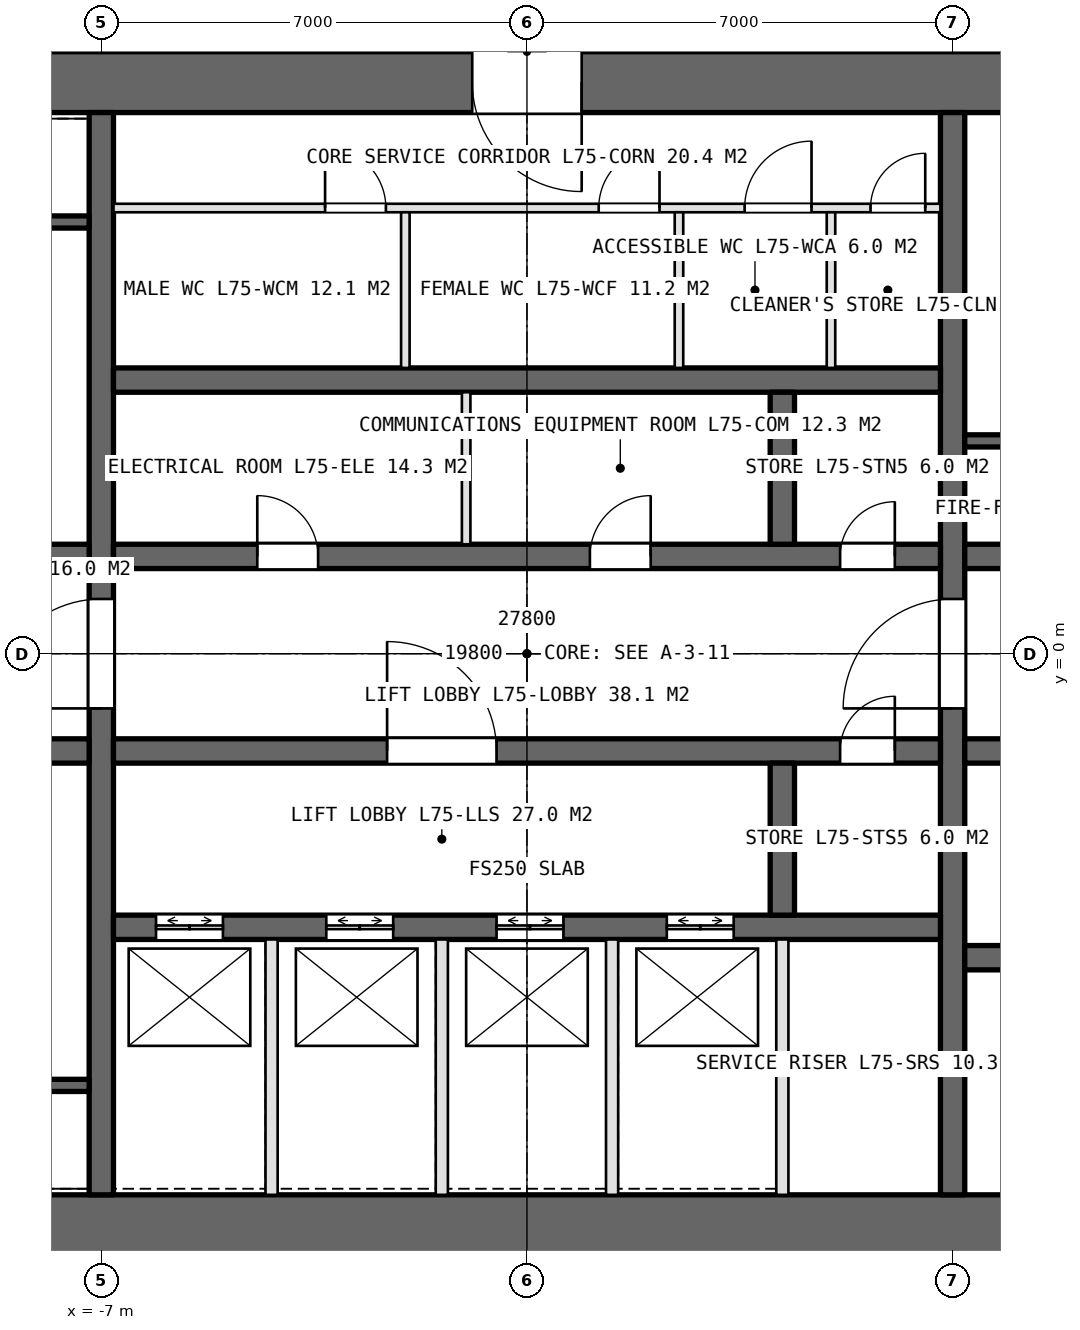
"""IFC4 building model, lengths in metres.
Left out: names, types, materials, properties, quantities, classifications, styles, units other than length and angle.
Written with IfcOpenShell. Run it as: python <this file> out.ifc"""

import sys

from ifc_helpers import new_model, si_unit, direction, frame, frame_2d, origin, place, context, subcontext, project, spatial, rectangle, extrude, element, fill, save


model = new_model("IFC4")
c1 = context("Model", 3, precision=1e-05, world=origin(), true_north=direction((0.0, 1.0)))
c2 = subcontext(c1, "Body", "Model", "MODEL_VIEW")
j1 = project(units=[si_unit("LENGTHUNIT", "METRE"), si_unit("PLANEANGLEUNIT", "RADIAN")], contexts=[c1])
p1 = place(None, origin())
s1 = spatial("IfcSite", under=j1, at=p1, CompositionType="ELEMENT")
p2 = place(p1, origin())
s2 = spatial("IfcBuilding", under=s1, at=p2, CompositionType="ELEMENT")
p3 = place(p2, frame((0.0, 0.0, 334.2)))
s3 = spatial("IfcBuildingStorey", under=s2, at=p3, CompositionType="ELEMENT", Elevation=334.2)
p4 = place(p3, frame((-13.9, -9.4, 0.0), z_axis=(0.0, 0.0, 1.0), x_axis=(1.0, 0.0, 0.0)))
e1 = element("IfcWall", 1, at=p4, inside=s3, PredefinedType="SHEAR", context=c2, shape_type="SweptSolid", body=[
    extrude(rectangle(XDim=27.8, YDim=1.0, at=frame_2d((13.9, 0.0))), origin(), (0.0, 0.0, 1.0), 5.0),
])
p5 = place(p4, frame((22.95, 0.0, 0.0)))
e2 = element("IfcOpeningElement", 2, at=p5, cuts=e1, PredefinedType="OPENING", context=c2, shape_type="SweptSolid", body=[
    extrude(rectangle(XDim=2.2, YDim=2.7, at=frame_2d((1.1, 1.35))), frame((0.0, 0.51, 0.0), z_axis=(0.0, -1.0, 0.0), x_axis=(1.0, 0.0, 0.0)), (0.0, 0.0, 1.0), 1.02),
])
p6 = place(p3, frame((13.9, 9.4, 0.0), z_axis=(0.0, 0.0, 1.0), x_axis=(-1.0, 0.0, 0.0)))
e3 = element("IfcWall", 3, at=p6, inside=s3, PredefinedType="SHEAR", context=c2, shape_type="SweptSolid", body=[
    extrude(rectangle(XDim=27.8, YDim=1.0, at=frame_2d((13.9, 0.0))), origin(), (0.0, 0.0, 1.0), 5.0),
])
p7 = place(p6, frame((23.9, 0.0, 0.0)))
e4 = element("IfcOpeningElement", 4, at=p7, cuts=e3, PredefinedType="OPENING", context=c2, shape_type="SweptSolid", body=[
    extrude(rectangle(XDim=1.0, YDim=2.4, at=frame_2d((0.5, 1.2))), frame((0.0, 0.51, 0.0), z_axis=(0.0, -1.0, 0.0), x_axis=(1.0, 0.0, 0.0)), (0.0, 0.0, 1.0), 1.02),
])
p8 = place(p6, frame((13.0, 0.0, 0.0)))
e5 = element("IfcOpeningElement", 5, at=p8, cuts=e3, PredefinedType="OPENING", context=c2, shape_type="SweptSolid", body=[
    extrude(rectangle(XDim=1.8, YDim=2.4, at=frame_2d((0.9, 1.2))), frame((0.0, 0.51, 0.0), z_axis=(0.0, -1.0, 0.0), x_axis=(1.0, 0.0, 0.0)), (0.0, 0.0, 1.0), 1.02),
])
p9 = place(p3, frame((-7.0, -8.9, 0.0), z_axis=(0.0, 0.0, 1.0), x_axis=(0.0, 1.0, 0.0)))
e6 = element("IfcWall", 6, at=p9, inside=s3, PredefinedType="SHEAR", context=c2, shape_type="SweptSolid", body=[
    extrude(rectangle(XDim=17.8, YDim=0.4, at=frame_2d((8.9, 0.0))), origin(), (0.0, 0.0, 1.0), 5.0),
])
p10 = place(p9, frame((8.0, 0.0, 0.0)))
e7 = element("IfcOpeningElement", 7, at=p10, cuts=e6, PredefinedType="OPENING", context=c2, shape_type="SweptSolid", body=[
    extrude(rectangle(XDim=1.8, YDim=2.4, at=frame_2d((0.9, 1.2))), frame((0.0, 0.21, 0.0), z_axis=(0.0, -1.0, 0.0), x_axis=(1.0, 0.0, 0.0)), (0.0, 0.0, 1.0), 0.42),
])
p11 = place(p3, frame((7.0, -8.9, 0.0), z_axis=(0.0, 0.0, 1.0), x_axis=(0.0, 1.0, 0.0)))
e8 = element("IfcWall", 8, at=p11, inside=s3, PredefinedType="SHEAR", context=c2, shape_type="SweptSolid", body=[
    extrude(rectangle(XDim=17.8, YDim=0.4, at=frame_2d((8.9, 0.0))), origin(), (0.0, 0.0, 1.0), 5.0),
])
p12 = place(p11, frame((8.0, 0.0, 0.0)))
e9 = element("IfcOpeningElement", 9, at=p12, cuts=e8, PredefinedType="OPENING", context=c2, shape_type="SweptSolid", body=[
    extrude(rectangle(XDim=1.8, YDim=2.4, at=frame_2d((0.9, 1.2))), frame((0.0, 0.21, 0.0), z_axis=(0.0, -1.0, 0.0), x_axis=(1.0, 0.0, 0.0)), (0.0, 0.0, 1.0), 0.42),
])
p13 = place(p3, frame((-6.8, 1.6, 0.0), z_axis=(0.0, 0.0, 1.0), x_axis=(1.0, 0.0, 0.0)))
e10 = element("IfcWall", 10, at=p13, inside=s3, PredefinedType="SHEAR", context=c2, shape_type="SweptSolid", body=[
    extrude(rectangle(XDim=13.6, YDim=0.4, at=frame_2d((6.8, 0.0))), origin(), (0.0, 0.0, 1.0), 5.0),
])
p14 = place(p13, frame((2.365, 0.0, 0.0)))
e11 = element("IfcOpeningElement", 11, at=p14, cuts=e10, PredefinedType="OPENING", context=c2, shape_type="SweptSolid", body=[
    extrude(rectangle(XDim=1.0, YDim=2.4, at=frame_2d((0.5, 1.2))), frame((0.0, 0.21, 0.0), z_axis=(0.0, -1.0, 0.0), x_axis=(1.0, 0.0, 0.0)), (0.0, 0.0, 1.0), 0.42),
])
p15 = place(p13, frame((7.835, 0.0, 0.0)))
e12 = element("IfcOpeningElement", 12, at=p15, cuts=e10, PredefinedType="OPENING", context=c2, shape_type="SweptSolid", body=[
    extrude(rectangle(XDim=1.0, YDim=2.4, at=frame_2d((0.5, 1.2))), frame((0.0, 0.21, 0.0), z_axis=(0.0, -1.0, 0.0), x_axis=(1.0, 0.0, 0.0)), (0.0, 0.0, 1.0), 0.42),
])
p16 = place(p13, frame((11.95, 0.0, 0.0)))
e13 = element("IfcOpeningElement", 13, at=p16, cuts=e10, PredefinedType="OPENING", context=c2, shape_type="SweptSolid", body=[
    extrude(rectangle(XDim=0.9, YDim=2.4, at=frame_2d((0.45, 1.2))), frame((0.0, 0.21, 0.0), z_axis=(0.0, -1.0, 0.0), x_axis=(1.0, 0.0, 0.0)), (0.0, 0.0, 1.0), 0.42),
])
p17 = place(p3, frame((-6.8, -1.6, 0.0), z_axis=(0.0, 0.0, 1.0), x_axis=(1.0, 0.0, 0.0)))
e14 = element("IfcWall", 14, at=p17, inside=s3, PredefinedType="SHEAR", context=c2, shape_type="SweptSolid", body=[
    extrude(rectangle(XDim=13.6, YDim=0.4, at=frame_2d((6.8, 0.0))), origin(), (0.0, 0.0, 1.0), 5.0),
])
p18 = place(p17, frame((11.95, 0.0, 0.0)))
e15 = element("IfcOpeningElement", 15, at=p18, cuts=e14, PredefinedType="OPENING", context=c2, shape_type="SweptSolid", body=[
    extrude(rectangle(XDim=0.9, YDim=2.4, at=frame_2d((0.45, 1.2))), frame((0.0, 0.21, 0.0), z_axis=(0.0, -1.0, 0.0), x_axis=(1.0, 0.0, 0.0)), (0.0, 0.0, 1.0), 0.42),
])
p19 = place(p17, frame((4.5, 0.0, 0.0)))
e16 = element("IfcOpeningElement", 16, at=p19, cuts=e14, PredefinedType="OPENING", context=c2, shape_type="SweptSolid", body=[
    extrude(rectangle(XDim=1.8, YDim=2.4, at=frame_2d((0.9, 1.2))), frame((0.0, 0.21, 0.0), z_axis=(0.0, -1.0, 0.0), x_axis=(1.0, 0.0, 0.0)), (0.0, 0.0, 1.0), 0.42),
])
p20 = place(p3, frame((-6.8, 4.5, 0.0), z_axis=(0.0, 0.0, 1.0), x_axis=(1.0, 0.0, 0.0)))
e17 = element("IfcWall", 17, at=p20, inside=s3, PredefinedType="SHEAR", context=c2, shape_type="SweptSolid", body=[
    extrude(rectangle(XDim=13.6, YDim=0.4, at=frame_2d((6.8, 0.0))), origin(), (0.0, 0.0, 1.0), 5.0),
])
p21 = place(p3, frame((-6.8, -4.5, 0.0), z_axis=(0.0, 0.0, 1.0), x_axis=(1.0, 0.0, 0.0)))
e18 = element("IfcWall", 18, at=p21, inside=s3, PredefinedType="SHEAR", context=c2, shape_type="SweptSolid", body=[
    extrude(rectangle(XDim=13.6, YDim=0.4, at=frame_2d((6.8, 0.0))), origin(), (0.0, 0.0, 1.0), 5.0),
])
p22 = place(p21, frame((0.7, 0.0, 0.0)))
e19 = element("IfcOpeningElement", 19, at=p22, cuts=e18, PredefinedType="OPENING", context=c2, shape_type="SweptSolid", body=[
    extrude(rectangle(XDim=1.1, YDim=2.4, at=frame_2d((0.55, 1.2))), frame((0.0, 0.21, 0.0), z_axis=(0.0, -1.0, 0.0), x_axis=(1.0, 0.0, 0.0)), (0.0, 0.0, 1.0), 0.42),
])
p23 = place(p21, frame((3.5, 0.0, 0.0)))
e20 = element("IfcOpeningElement", 20, at=p23, cuts=e18, PredefinedType="OPENING", context=c2, shape_type="SweptSolid", body=[
    extrude(rectangle(XDim=1.1, YDim=2.4, at=frame_2d((0.55, 1.2))), frame((0.0, 0.21, 0.0), z_axis=(0.0, -1.0, 0.0), x_axis=(1.0, 0.0, 0.0)), (0.0, 0.0, 1.0), 0.42),
])
p24 = place(p21, frame((6.3, 0.0, 0.0)))
e21 = element("IfcOpeningElement", 21, at=p24, cuts=e18, PredefinedType="OPENING", context=c2, shape_type="SweptSolid", body=[
    extrude(rectangle(XDim=1.1, YDim=2.4, at=frame_2d((0.55, 1.2))), frame((0.0, 0.21, 0.0), z_axis=(0.0, -1.0, 0.0), x_axis=(1.0, 0.0, 0.0)), (0.0, 0.0, 1.0), 0.42),
])
p25 = place(p21, frame((9.1, 0.0, 0.0)))
e22 = element("IfcOpeningElement", 22, at=p25, cuts=e18, PredefinedType="OPENING", context=c2, shape_type="SweptSolid", body=[
    extrude(rectangle(XDim=1.1, YDim=2.4, at=frame_2d((0.55, 1.2))), frame((0.0, 0.21, 0.0), z_axis=(0.0, -1.0, 0.0), x_axis=(1.0, 0.0, 0.0)), (0.0, 0.0, 1.0), 0.42),
])
for number, where, z_axis, x_axis in (
    (23, (-12.9, 1.6, 0.0), (0.0, 0.0, 1.0), (1.0, 0.0, 0.0)),
    (24, (-12.9, -1.6, 0.0), (0.0, 0.0, 1.0), (1.0, 0.0, 0.0)),
):
    element("IfcWall", number, at=place(p3, frame(where, z_axis=z_axis, x_axis=x_axis)), inside=s3, PredefinedType="SHEAR", context=c2, shape_type="SweptSolid", body=[
        extrude(rectangle(XDim=5.7, YDim=0.4, at=frame_2d((2.85, 0.0))), origin(), (0.0, 0.0, 1.0), 5.0),
    ])
p26 = place(p3, frame((7.2, 1.6, 0.0), z_axis=(0.0, 0.0, 1.0), x_axis=(1.0, 0.0, 0.0)))
e25 = element("IfcWall", 25, at=p26, inside=s3, PredefinedType="SHEAR", context=c2, shape_type="SweptSolid", body=[
    extrude(rectangle(XDim=5.7, YDim=0.4, at=frame_2d((2.85, 0.0))), origin(), (0.0, 0.0, 1.0), 5.0),
])
p27 = place(p26, frame((0.7, 0.0, 0.0)))
e26 = element("IfcOpeningElement", 26, at=p27, cuts=e25, PredefinedType="OPENING", context=c2, shape_type="SweptSolid", body=[
    extrude(rectangle(XDim=1.0, YDim=2.4, at=frame_2d((0.5, 1.2))), frame((0.0, 0.21, 0.0), z_axis=(0.0, -1.0, 0.0), x_axis=(1.0, 0.0, 0.0)), (0.0, 0.0, 1.0), 0.42),
])
p28 = place(p3, frame((7.2, -1.6, 0.0), z_axis=(0.0, 0.0, 1.0), x_axis=(1.0, 0.0, 0.0)))
e27 = element("IfcWall", 27, at=p28, inside=s3, PredefinedType="SHEAR", context=c2, shape_type="SweptSolid", body=[
    extrude(rectangle(XDim=5.7, YDim=0.4, at=frame_2d((2.85, 0.0))), origin(), (0.0, 0.0, 1.0), 5.0),
])
p29 = place(p28, frame((0.9, 0.0, 0.0)))
e28 = element("IfcOpeningElement", 28, at=p29, cuts=e27, PredefinedType="OPENING", context=c2, shape_type="SweptSolid", body=[
    extrude(rectangle(XDim=1.3, YDim=2.4, at=frame_2d((0.65, 1.2))), frame((0.0, 0.21, 0.0), z_axis=(0.0, -1.0, 0.0), x_axis=(1.0, 0.0, 0.0)), (0.0, 0.0, 1.0), 0.42),
])
p30 = place(p28, frame((3.95, 0.0, 0.0)))
e29 = element("IfcOpeningElement", 29, at=p30, cuts=e27, PredefinedType="OPENING", context=c2, shape_type="SweptSolid", body=[
    extrude(rectangle(XDim=1.3, YDim=2.4, at=frame_2d((0.65, 1.2))), frame((0.0, 0.21, 0.0), z_axis=(0.0, -1.0, 0.0), x_axis=(1.0, 0.0, 0.0)), (0.0, 0.0, 1.0), 0.42),
])
p31 = place(p3, frame((7.2, -5.0, 0.0), z_axis=(0.0, 0.0, 1.0), x_axis=(1.0, 0.0, 0.0)))
e30 = element("IfcWall", 30, at=p31, inside=s3, PredefinedType="SHEAR", context=c2, shape_type="SweptSolid", body=[
    extrude(rectangle(XDim=5.7, YDim=0.4, at=frame_2d((2.85, 0.0))), origin(), (0.0, 0.0, 1.0), 5.0),
])
for number, where, z_axis, x_axis in (
    (31, (4.2, 1.8, 0.0), (0.0, 0.0, 1.0), (0.0, 1.0, 0.0)),
    (32, (4.2, -4.3, 0.0), (0.0, 0.0, 1.0), (0.0, 1.0, 0.0)),
):
    element("IfcWall", number, at=place(p3, frame(where, z_axis=z_axis, x_axis=x_axis)), inside=s3, PredefinedType="SHEAR", context=c2, shape_type="SweptSolid", body=[
        extrude(rectangle(XDim=2.5, YDim=0.4, at=frame_2d((1.25, 0.0))), origin(), (0.0, 0.0, 1.0), 5.0),
    ])
p32 = place(p3, frame((-6.8, 7.33, 0.0), z_axis=(0.0, 0.0, 1.0), x_axis=(1.0, 0.0, 0.0)))
e33 = element("IfcWall", 33, at=p32, inside=s3, PredefinedType="PARTITIONING", context=c2, shape_type="SweptSolid", body=[
    extrude(rectangle(XDim=13.6, YDim=0.14, at=frame_2d((6.8, 0.0))), origin(), (0.0, 0.0, 1.0), 4.75),
])
p33 = place(p32, frame((3.48, 0.0, 0.0)))
e34 = element("IfcOpeningElement", 34, at=p33, cuts=e33, PredefinedType="OPENING", context=c2, shape_type="SweptSolid", body=[
    extrude(rectangle(XDim=1.0, YDim=2.4, at=frame_2d((0.5, 1.2))), frame((0.0, 0.08, 0.0), z_axis=(0.0, -1.0, 0.0), x_axis=(1.0, 0.0, 0.0)), (0.0, 0.0, 1.0), 0.16),
])
p34 = place(p32, frame((7.98, 0.0, 0.0)))
e35 = element("IfcOpeningElement", 35, at=p34, cuts=e33, PredefinedType="OPENING", context=c2, shape_type="SweptSolid", body=[
    extrude(rectangle(XDim=1.0, YDim=2.4, at=frame_2d((0.5, 1.2))), frame((0.0, 0.08, 0.0), z_axis=(0.0, -1.0, 0.0), x_axis=(1.0, 0.0, 0.0)), (0.0, 0.0, 1.0), 0.16),
])
p35 = place(p32, frame((10.38, 0.0, 0.0)))
e36 = element("IfcOpeningElement", 36, at=p35, cuts=e33, PredefinedType="OPENING", context=c2, shape_type="SweptSolid", body=[
    extrude(rectangle(XDim=1.1, YDim=2.4, at=frame_2d((0.55, 1.2))), frame((0.0, 0.08, 0.0), z_axis=(0.0, -1.0, 0.0), x_axis=(1.0, 0.0, 0.0)), (0.0, 0.0, 1.0), 0.16),
])
p36 = place(p32, frame((12.45, 0.0, 0.0)))
e37 = element("IfcOpeningElement", 37, at=p36, cuts=e33, PredefinedType="OPENING", context=c2, shape_type="SweptSolid", body=[
    extrude(rectangle(XDim=0.9, YDim=2.4, at=frame_2d((0.45, 1.2))), frame((0.0, 0.08, 0.0), z_axis=(0.0, -1.0, 0.0), x_axis=(1.0, 0.0, 0.0)), (0.0, 0.0, 1.0), 0.16),
])
for number, where, z_axis, x_axis in (
    (38, (-2.0, 4.7, 0.0), (0.0, 0.0, 1.0), (0.0, 1.0, 0.0)),
    (39, (2.5, 4.7, 0.0), (0.0, 0.0, 1.0), (0.0, 1.0, 0.0)),
    (40, (5.0, 4.7, 0.0), (0.0, 0.0, 1.0), (0.0, 1.0, 0.0)),
):
    element("IfcWall", number, at=place(p3, frame(where, z_axis=z_axis, x_axis=x_axis)), inside=s3, PredefinedType="PARTITIONING", context=c2, shape_type="SweptSolid", body=[
        extrude(rectangle(XDim=2.56, YDim=0.14, at=frame_2d((1.28, 0.0))), origin(), (0.0, 0.0, 1.0), 4.75),
    ])
p37 = place(p3, frame((-1.0, 1.8, 0.0), z_axis=(0.0, 0.0, 1.0), x_axis=(0.0, 1.0, 0.0)))
e41 = element("IfcWall", 41, at=p37, inside=s3, PredefinedType="PARTITIONING", context=c2, shape_type="SweptSolid", body=[
    extrude(rectangle(XDim=2.5, YDim=0.14, at=frame_2d((1.25, 0.0))), origin(), (0.0, 0.0, 1.0), 4.75),
])
for number, where, z_axis, x_axis in (
    (42, (-4.2, -4.7, 0.0), (0.0, 0.0, 1.0), (0.0, -1.0, 0.0)),
    (43, (-1.4, -4.7, 0.0), (0.0, 0.0, 1.0), (0.0, -1.0, 0.0)),
    (44, (1.4, -4.7, 0.0), (0.0, 0.0, 1.0), (0.0, -1.0, 0.0)),
    (45, (4.2, -4.7, 0.0), (0.0, 0.0, 1.0), (0.0, -1.0, 0.0)),
):
    element("IfcWall", number, at=place(p3, frame(where, z_axis=z_axis, x_axis=x_axis)), inside=s3, PredefinedType="PARTITIONING", context=c2, shape_type="SweptSolid", body=[
        extrude(rectangle(XDim=4.2, YDim=0.2, at=frame_2d((2.1, 0.0))), origin(), (0.0, 0.0, 1.0), 5.0),
    ])
for number, where, z_axis, x_axis in (
    (46, (-9.15, 7.1, 0.0), (0.0, 0.0, 1.0), (1.0, 0.0, 0.0)),
    (47, (-9.15, -7.1, 0.0), (0.0, 0.0, 1.0), (1.0, 0.0, 0.0)),
    (48, (9.15, 3.5, 0.0), (0.0, 0.0, 1.0), (-1.0, 0.0, 0.0)),
):
    element("IfcWall", number, at=place(p3, frame(where, z_axis=z_axis, x_axis=x_axis)), inside=s3, PredefinedType="SOLIDWALL", context=c2, shape_type="SweptSolid", body=[
        extrude(rectangle(XDim=1.95, YDim=0.2, at=frame_2d((0.975, 0.0))), origin(), (0.0, 0.0, 1.0), 5.0),
    ])
p38 = place(p10, origin())
e49 = element("IfcDoor", 49, at=p38, inside=s3, OperationType="DOUBLE_DOOR_SINGLE_SWING", PredefinedType="DOOR", context=c2, shape_type="SweptSolid", body=[
    extrude(rectangle(XDim=1.8, YDim=2.4, at=frame_2d((0.9, 1.2))), frame((0.0, 0.025, 0.0), z_axis=(0.0, -1.0, 0.0), x_axis=(1.0, 0.0, 0.0)), (0.0, 0.0, 1.0), 0.05),
])
fill(e7, e49)
p39 = place(p12, origin())
e50 = element("IfcDoor", 50, at=p39, inside=s3, OperationType="DOUBLE_DOOR_SINGLE_SWING", PredefinedType="DOOR", context=c2, shape_type="SweptSolid", body=[
    extrude(rectangle(XDim=1.8, YDim=2.4, at=frame_2d((0.9, 1.2))), frame((0.0, 0.025, 0.0), z_axis=(0.0, -1.0, 0.0), x_axis=(1.0, 0.0, 0.0)), (0.0, 0.0, 1.0), 0.05),
])
fill(e9, e50)
p40 = place(p33, origin())
e51 = element("IfcDoor", 51, at=p40, inside=s3, OperationType="SINGLE_SWING_LEFT", PredefinedType="DOOR", context=c2, shape_type="SweptSolid", body=[
    extrude(rectangle(XDim=1.0, YDim=2.4, at=frame_2d((0.5, 1.2))), frame((0.0, 0.025, 0.0), z_axis=(0.0, -1.0, 0.0), x_axis=(1.0, 0.0, 0.0)), (0.0, 0.0, 1.0), 0.05),
])
fill(e34, e51)
p41 = place(p34, origin())
e52 = element("IfcDoor", 52, at=p41, inside=s3, OperationType="SINGLE_SWING_RIGHT", PredefinedType="DOOR", context=c2, shape_type="SweptSolid", body=[
    extrude(rectangle(XDim=1.0, YDim=2.4, at=frame_2d((0.5, 1.2))), frame((0.0, 0.025, 0.0), z_axis=(0.0, -1.0, 0.0), x_axis=(1.0, 0.0, 0.0)), (0.0, 0.0, 1.0), 0.05),
])
fill(e35, e52)
p42 = place(p35, origin())
e53 = element("IfcDoor", 53, at=p42, inside=s3, OperationType="SINGLE_SWING_RIGHT", PredefinedType="DOOR", context=c2, shape_type="SweptSolid", body=[
    extrude(rectangle(XDim=1.1, YDim=2.4, at=frame_2d((0.55, 1.2))), frame((0.0, 0.025, 0.0), z_axis=(0.0, -1.0, 0.0), x_axis=(1.0, 0.0, 0.0)), (0.0, 0.0, 1.0), 0.05),
])
fill(e36, e53)
p43 = place(p36, origin())
e54 = element("IfcDoor", 54, at=p43, inside=s3, OperationType="SINGLE_SWING_RIGHT", PredefinedType="DOOR", context=c2, shape_type="SweptSolid", body=[
    extrude(rectangle(XDim=0.9, YDim=2.4, at=frame_2d((0.45, 1.2))), frame((0.0, 0.025, 0.0), z_axis=(0.0, -1.0, 0.0), x_axis=(1.0, 0.0, 0.0)), (0.0, 0.0, 1.0), 0.05),
])
fill(e37, e54)
p44 = place(p14, origin())
e55 = element("IfcDoor", 55, at=p44, inside=s3, OperationType="SINGLE_SWING_LEFT", PredefinedType="DOOR", context=c2, shape_type="SweptSolid", body=[
    extrude(rectangle(XDim=1.0, YDim=2.4, at=frame_2d((0.5, 1.2))), frame((0.0, 0.025, 0.0), z_axis=(0.0, -1.0, 0.0), x_axis=(1.0, 0.0, 0.0)), (0.0, 0.0, 1.0), 0.05),
])
fill(e11, e55)
p45 = place(p15, origin())
e56 = element("IfcDoor", 56, at=p45, inside=s3, OperationType="SINGLE_SWING_RIGHT", PredefinedType="DOOR", context=c2, shape_type="SweptSolid", body=[
    extrude(rectangle(XDim=1.0, YDim=2.4, at=frame_2d((0.5, 1.2))), frame((0.0, 0.025, 0.0), z_axis=(0.0, -1.0, 0.0), x_axis=(1.0, 0.0, 0.0)), (0.0, 0.0, 1.0), 0.05),
])
fill(e12, e56)
p46 = place(p16, origin())
e57 = element("IfcDoor", 57, at=p46, inside=s3, OperationType="SINGLE_SWING_RIGHT", PredefinedType="DOOR", context=c2, shape_type="SweptSolid", body=[
    extrude(rectangle(XDim=0.9, YDim=2.4, at=frame_2d((0.45, 1.2))), frame((0.0, 0.025, 0.0), z_axis=(0.0, -1.0, 0.0), x_axis=(1.0, 0.0, 0.0)), (0.0, 0.0, 1.0), 0.05),
])
fill(e13, e57)
p47 = place(p18, origin())
e58 = element("IfcDoor", 58, at=p47, inside=s3, OperationType="SINGLE_SWING_RIGHT", PredefinedType="DOOR", context=c2, shape_type="SweptSolid", body=[
    extrude(rectangle(XDim=0.9, YDim=2.4, at=frame_2d((0.45, 1.2))), frame((0.0, 0.025, 0.0), z_axis=(0.0, -1.0, 0.0), x_axis=(1.0, 0.0, 0.0)), (0.0, 0.0, 1.0), 0.05),
])
fill(e15, e58)
p48 = place(p19, origin())
e59 = element("IfcDoor", 59, at=p48, inside=s3, OperationType="DOUBLE_DOOR_SINGLE_SWING", PredefinedType="DOOR", context=c2, shape_type="SweptSolid", body=[
    extrude(rectangle(XDim=1.8, YDim=2.4, at=frame_2d((0.9, 1.2))), frame((0.0, 0.025, 0.0), z_axis=(0.0, -1.0, 0.0), x_axis=(1.0, 0.0, 0.0)), (0.0, 0.0, 1.0), 0.05),
])
fill(e16, e59)
p49 = place(p8, origin())
e60 = element("IfcDoor", 60, at=p49, inside=s3, OperationType="DOUBLE_DOOR_SINGLE_SWING", PredefinedType="DOOR", context=c2, shape_type="SweptSolid", body=[
    extrude(rectangle(XDim=1.8, YDim=2.4, at=frame_2d((0.9, 1.2))), frame((0.0, 0.025, 0.0), z_axis=(0.0, -1.0, 0.0), x_axis=(1.0, 0.0, 0.0)), (0.0, 0.0, 1.0), 0.05),
])
fill(e5, e60)
p50 = place(p22, origin())
e61 = element("IfcDoor", 61, at=p50, inside=s3, OperationType="DOUBLE_DOOR_SLIDING", PredefinedType="DOOR", context=c2, shape_type="SweptSolid", body=[
    extrude(rectangle(XDim=1.1, YDim=2.4, at=frame_2d((0.55, 1.2))), frame((0.0, 0.025, 0.0), z_axis=(0.0, -1.0, 0.0), x_axis=(1.0, 0.0, 0.0)), (0.0, 0.0, 1.0), 0.05),
])
fill(e19, e61)
p51 = place(p23, origin())
e62 = element("IfcDoor", 62, at=p51, inside=s3, OperationType="DOUBLE_DOOR_SLIDING", PredefinedType="DOOR", context=c2, shape_type="SweptSolid", body=[
    extrude(rectangle(XDim=1.1, YDim=2.4, at=frame_2d((0.55, 1.2))), frame((0.0, 0.025, 0.0), z_axis=(0.0, -1.0, 0.0), x_axis=(1.0, 0.0, 0.0)), (0.0, 0.0, 1.0), 0.05),
])
fill(e20, e62)
p52 = place(p24, origin())
e63 = element("IfcDoor", 63, at=p52, inside=s3, OperationType="DOUBLE_DOOR_SLIDING", PredefinedType="DOOR", context=c2, shape_type="SweptSolid", body=[
    extrude(rectangle(XDim=1.1, YDim=2.4, at=frame_2d((0.55, 1.2))), frame((0.0, 0.025, 0.0), z_axis=(0.0, -1.0, 0.0), x_axis=(1.0, 0.0, 0.0)), (0.0, 0.0, 1.0), 0.05),
])
fill(e21, e63)
p53 = place(p25, origin())
e64 = element("IfcDoor", 64, at=p53, inside=s3, OperationType="DOUBLE_DOOR_SLIDING", PredefinedType="DOOR", context=c2, shape_type="SweptSolid", body=[
    extrude(rectangle(XDim=1.1, YDim=2.4, at=frame_2d((0.55, 1.2))), frame((0.0, 0.025, 0.0), z_axis=(0.0, -1.0, 0.0), x_axis=(1.0, 0.0, 0.0)), (0.0, 0.0, 1.0), 0.05),
])
fill(e22, e64)
save(model, sys.argv[1])
